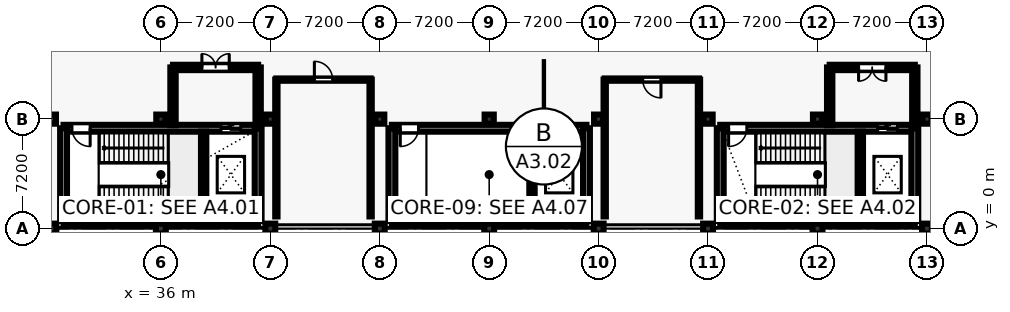
"""IFC4 building model, lengths in metres.
Left out: names, types, materials, properties, quantities, classifications, styles, units other than length and angle.
Written with IfcOpenShell. Run it as: python <this file> out.ifc"""

import sys

from ifc_helpers import new_model, si_unit, direction, frame, frame_2d, origin, origin_2d, place, context, subcontext, project, spatial, rectangle, extrude, element, fill, save


model = new_model("IFC4")
c1 = context("Model", 3, precision=1e-05, world=origin(), true_north=direction((0.0, 1.0)))
c2 = subcontext(c1, "Body", "Model", "MODEL_VIEW")
j1 = project(units=[si_unit("LENGTHUNIT", "METRE"), si_unit("PLANEANGLEUNIT", "RADIAN")], contexts=[c1])
p1 = place(None, origin())
s1 = spatial("IfcSite", under=j1, at=p1, CompositionType="ELEMENT")
p2 = place(p1, origin())
s2 = spatial("IfcBuilding", under=s1, at=p2, CompositionType="ELEMENT")
p3 = place(p2, frame((0.0, 0.0, 13.8)))
s3 = spatial("IfcBuildingStorey", under=s2, at=p3, CompositionType="ELEMENT", Elevation=13.8)
p4 = place(p3, frame((28.8, 0.0, 0.0), z_axis=(0.0, 0.0, 1.0), x_axis=(1.0, 0.0, 0.0)))
e1 = element("IfcColumn", 1, at=p4, inside=s3, PredefinedType="COLUMN", context=c2, shape_type="SweptSolid", body=[
    extrude(rectangle(XDim=0.65, YDim=0.65, at=origin_2d()), origin(), (0.0, 0.0, 1.0), 4.8),
])
p5 = place(p3, frame((28.8, 7.2, 0.0), z_axis=(0.0, 0.0, 1.0), x_axis=(1.0, 0.0, 0.0)))
e2 = element("IfcColumn", 2, at=p5, inside=s3, PredefinedType="COLUMN", context=c2, shape_type="SweptSolid", body=[
    extrude(rectangle(XDim=0.6, YDim=0.6, at=origin_2d()), origin(), (0.0, 0.0, 1.0), 4.8),
])
p6 = place(p3, frame((36.0, 0.0, 0.0), z_axis=(0.0, 0.0, 1.0), x_axis=(1.0, 0.0, 0.0)))
e3 = element("IfcColumn", 3, at=p6, inside=s3, PredefinedType="COLUMN", context=c2, shape_type="SweptSolid", body=[
    extrude(rectangle(XDim=0.65, YDim=0.65, at=origin_2d()), origin(), (0.0, 0.0, 1.0), 4.8),
])
p7 = place(p3, frame((36.0, 7.2, 0.0), z_axis=(0.0, 0.0, 1.0), x_axis=(1.0, 0.0, 0.0)))
e4 = element("IfcColumn", 4, at=p7, inside=s3, PredefinedType="COLUMN", context=c2, shape_type="SweptSolid", body=[
    extrude(rectangle(XDim=0.6, YDim=0.6, at=origin_2d()), origin(), (0.0, 0.0, 1.0), 4.8),
])
p8 = place(p3, frame((43.2, 0.0, 0.0), z_axis=(0.0, 0.0, 1.0), x_axis=(1.0, 0.0, 0.0)))
e5 = element("IfcColumn", 5, at=p8, inside=s3, PredefinedType="COLUMN", context=c2, shape_type="SweptSolid", body=[
    extrude(rectangle(XDim=0.65, YDim=0.65, at=origin_2d()), origin(), (0.0, 0.0, 1.0), 4.8),
])
p9 = place(p3, frame((43.2, 7.2, 0.0), z_axis=(0.0, 0.0, 1.0), x_axis=(1.0, 0.0, 0.0)))
e6 = element("IfcColumn", 6, at=p9, inside=s3, PredefinedType="COLUMN", context=c2, shape_type="SweptSolid", body=[
    extrude(rectangle(XDim=0.6, YDim=0.6, at=origin_2d()), origin(), (0.0, 0.0, 1.0), 4.8),
])
p10 = place(p3, frame((50.4, 0.0, 0.0), z_axis=(0.0, 0.0, 1.0), x_axis=(1.0, 0.0, 0.0)))
e7 = element("IfcColumn", 7, at=p10, inside=s3, PredefinedType="COLUMN", context=c2, shape_type="SweptSolid", body=[
    extrude(rectangle(XDim=0.65, YDim=0.65, at=origin_2d()), origin(), (0.0, 0.0, 1.0), 4.8),
])
p11 = place(p3, frame((50.4, 7.2, 0.0), z_axis=(0.0, 0.0, 1.0), x_axis=(1.0, 0.0, 0.0)))
e8 = element("IfcColumn", 8, at=p11, inside=s3, PredefinedType="COLUMN", context=c2, shape_type="SweptSolid", body=[
    extrude(rectangle(XDim=0.6, YDim=0.6, at=origin_2d()), origin(), (0.0, 0.0, 1.0), 4.8),
])
p12 = place(p3, frame((57.6, 0.0, 0.0), z_axis=(0.0, 0.0, 1.0), x_axis=(1.0, 0.0, 0.0)))
e9 = element("IfcColumn", 9, at=p12, inside=s3, PredefinedType="COLUMN", context=c2, shape_type="SweptSolid", body=[
    extrude(rectangle(XDim=0.65, YDim=0.65, at=origin_2d()), origin(), (0.0, 0.0, 1.0), 4.8),
])
p13 = place(p3, frame((57.6, 7.2, 0.0), z_axis=(0.0, 0.0, 1.0), x_axis=(1.0, 0.0, 0.0)))
e10 = element("IfcColumn", 10, at=p13, inside=s3, PredefinedType="COLUMN", context=c2, shape_type="SweptSolid", body=[
    extrude(rectangle(XDim=0.6, YDim=0.6, at=origin_2d()), origin(), (0.0, 0.0, 1.0), 4.8),
])
p14 = place(p3, frame((64.8, 0.0, 0.0), z_axis=(0.0, 0.0, 1.0), x_axis=(1.0, 0.0, 0.0)))
e11 = element("IfcColumn", 11, at=p14, inside=s3, PredefinedType="COLUMN", context=c2, shape_type="SweptSolid", body=[
    extrude(rectangle(XDim=0.65, YDim=0.65, at=origin_2d()), origin(), (0.0, 0.0, 1.0), 4.8),
])
p15 = place(p3, frame((64.8, 7.2, 0.0), z_axis=(0.0, 0.0, 1.0), x_axis=(1.0, 0.0, 0.0)))
e12 = element("IfcColumn", 12, at=p15, inside=s3, PredefinedType="COLUMN", context=c2, shape_type="SweptSolid", body=[
    extrude(rectangle(XDim=0.6, YDim=0.6, at=origin_2d()), origin(), (0.0, 0.0, 1.0), 4.8),
])
p16 = place(p3, frame((72.0, 0.0, 0.0), z_axis=(0.0, 0.0, 1.0), x_axis=(1.0, 0.0, 0.0)))
e13 = element("IfcColumn", 13, at=p16, inside=s3, PredefinedType="COLUMN", context=c2, shape_type="SweptSolid", body=[
    extrude(rectangle(XDim=0.65, YDim=0.65, at=origin_2d()), origin(), (0.0, 0.0, 1.0), 4.8),
])
p17 = place(p3, frame((72.0, 7.2, 0.0), z_axis=(0.0, 0.0, 1.0), x_axis=(1.0, 0.0, 0.0)))
e14 = element("IfcColumn", 14, at=p17, inside=s3, PredefinedType="COLUMN", context=c2, shape_type="SweptSolid", body=[
    extrude(rectangle(XDim=0.6, YDim=0.6, at=origin_2d()), origin(), (0.0, 0.0, 1.0), 4.8),
])
p18 = place(p3, frame((79.2, 0.0, 0.0), z_axis=(0.0, 0.0, 1.0), x_axis=(1.0, 0.0, 0.0)))
e15 = element("IfcColumn", 15, at=p18, inside=s3, PredefinedType="COLUMN", context=c2, shape_type="SweptSolid", body=[
    extrude(rectangle(XDim=0.65, YDim=0.65, at=origin_2d()), origin(), (0.0, 0.0, 1.0), 4.8),
])
p19 = place(p3, frame((79.2, 7.2, 0.0), z_axis=(0.0, 0.0, 1.0), x_axis=(1.0, 0.0, 0.0)))
e16 = element("IfcColumn", 16, at=p19, inside=s3, PredefinedType="COLUMN", context=c2, shape_type="SweptSolid", body=[
    extrude(rectangle(XDim=0.6, YDim=0.6, at=origin_2d()), origin(), (0.0, 0.0, 1.0), 4.8),
])
p20 = place(p3, frame((86.4, 0.0, 0.0), z_axis=(0.0, 0.0, 1.0), x_axis=(1.0, 0.0, 0.0)))
e17 = element("IfcColumn", 17, at=p20, inside=s3, PredefinedType="COLUMN", context=c2, shape_type="SweptSolid", body=[
    extrude(rectangle(XDim=0.65, YDim=0.65, at=origin_2d()), origin(), (0.0, 0.0, 1.0), 4.8),
])
p21 = place(p3, frame((86.4, 7.2, 0.0), z_axis=(0.0, 0.0, 1.0), x_axis=(1.0, 0.0, 0.0)))
e18 = element("IfcColumn", 18, at=p21, inside=s3, PredefinedType="COLUMN", context=c2, shape_type="SweptSolid", body=[
    extrude(rectangle(XDim=0.6, YDim=0.6, at=origin_2d()), origin(), (0.0, 0.0, 1.0), 4.8),
])
p22 = place(p3, frame((29.6, 0.5, 0.0), z_axis=(0.0, 0.0, 1.0), x_axis=(1.0, 0.0, 0.0)))
e19 = element("IfcWall", 19, at=p22, inside=s3, PredefinedType="SHEAR", context=c2, shape_type="SweptSolid", body=[
    extrude(rectangle(XDim=12.8, YDim=0.45, at=frame_2d((6.4, 0.0))), origin(), (0.0, 0.0, 1.0), 4.53),
])
p23 = place(p3, frame((29.6, 6.6, 0.0), z_axis=(0.0, 0.0, 1.0), x_axis=(1.0, 0.0, 0.0)))
e20 = element("IfcWall", 20, at=p23, inside=s3, PredefinedType="SHEAR", context=c2, shape_type="SweptSolid", body=[
    extrude(rectangle(XDim=12.8, YDim=0.45, at=frame_2d((6.4, 0.0))), origin(), (0.0, 0.0, 1.0), 4.53),
])
p24 = place(p23, frame((0.55, 0.0, 0.0)))
e21 = element("IfcOpeningElement", 21, at=p24, cuts=e20, PredefinedType="OPENING", context=c2, shape_type="SweptSolid", body=[
    extrude(rectangle(XDim=1.2, YDim=2.25, at=frame_2d((0.6, 1.125))), frame((0.0, 0.235, 0.0), z_axis=(0.0, -1.0, 0.0), x_axis=(1.0, 0.0, 0.0)), (0.0, 0.0, 1.0), 0.47),
])
p25 = place(p23, frame((10.358, 0.0, 0.0)))
e22 = element("IfcOpeningElement", 22, at=p25, cuts=e20, PredefinedType="OPENING", context=c2, shape_type="SweptSolid", body=[
    extrude(rectangle(XDim=1.3, YDim=2.25, at=frame_2d((0.65, 1.125))), frame((0.0, 0.235, 0.0), z_axis=(0.0, -1.0, 0.0), x_axis=(1.0, 0.0, 0.0)), (0.0, 0.0, 1.0), 0.47),
])
for number, where, z_axis, x_axis in (
    (23, (29.6, 0.5, 0.0), (0.0, 0.0, 1.0), (0.0, 1.0, 0.0)),
    (24, (42.4, 0.5, 0.0), (0.0, 0.0, 1.0), (0.0, 1.0, 0.0)),
):
    element("IfcWall", number, at=place(p3, frame(where, z_axis=z_axis, x_axis=x_axis)), inside=s3, PredefinedType="SHEAR", context=c2, shape_type="SweptSolid", body=[
        extrude(rectangle(XDim=6.1, YDim=0.45, at=frame_2d((3.05, 0.0))), origin(), (0.0, 0.0, 1.0), 4.53),
    ])
p26 = place(p3, frame((38.816, 0.725, 0.0), z_axis=(0.0, 0.0, 1.0), x_axis=(0.0, 1.0, 0.0)))
e25 = element("IfcWall", 25, at=p26, inside=s3, PredefinedType="SHEAR", context=c2, shape_type="SweptSolid", body=[
    extrude(rectangle(XDim=5.65, YDim=0.35, at=frame_2d((2.825, 0.0))), origin(), (0.0, 0.0, 1.0), 4.53),
])
p27 = place(p3, frame((72.8, 0.5, 0.0), z_axis=(0.0, 0.0, 1.0), x_axis=(1.0, 0.0, 0.0)))
e26 = element("IfcWall", 26, at=p27, inside=s3, PredefinedType="SHEAR", context=c2, shape_type="SweptSolid", body=[
    extrude(rectangle(XDim=12.8, YDim=0.45, at=frame_2d((6.4, 0.0))), origin(), (0.0, 0.0, 1.0), 4.53),
])
p28 = place(p3, frame((72.8, 6.6, 0.0), z_axis=(0.0, 0.0, 1.0), x_axis=(1.0, 0.0, 0.0)))
e27 = element("IfcWall", 27, at=p28, inside=s3, PredefinedType="SHEAR", context=c2, shape_type="SweptSolid", body=[
    extrude(rectangle(XDim=12.8, YDim=0.45, at=frame_2d((6.4, 0.0))), origin(), (0.0, 0.0, 1.0), 4.53),
])
p29 = place(p28, frame((0.55, 0.0, 0.0)))
e28 = element("IfcOpeningElement", 28, at=p29, cuts=e27, PredefinedType="OPENING", context=c2, shape_type="SweptSolid", body=[
    extrude(rectangle(XDim=1.2, YDim=2.25, at=frame_2d((0.6, 1.125))), frame((0.0, 0.235, 0.0), z_axis=(0.0, -1.0, 0.0), x_axis=(1.0, 0.0, 0.0)), (0.0, 0.0, 1.0), 0.47),
])
p30 = place(p28, frame((10.358, 0.0, 0.0)))
e29 = element("IfcOpeningElement", 29, at=p30, cuts=e27, PredefinedType="OPENING", context=c2, shape_type="SweptSolid", body=[
    extrude(rectangle(XDim=1.3, YDim=2.25, at=frame_2d((0.65, 1.125))), frame((0.0, 0.235, 0.0), z_axis=(0.0, -1.0, 0.0), x_axis=(1.0, 0.0, 0.0)), (0.0, 0.0, 1.0), 0.47),
])
for number, where, z_axis, x_axis in (
    (30, (72.8, 0.5, 0.0), (0.0, 0.0, 1.0), (0.0, 1.0, 0.0)),
    (31, (85.6, 0.5, 0.0), (0.0, 0.0, 1.0), (0.0, 1.0, 0.0)),
):
    element("IfcWall", number, at=place(p3, frame(where, z_axis=z_axis, x_axis=x_axis)), inside=s3, PredefinedType="SHEAR", context=c2, shape_type="SweptSolid", body=[
        extrude(rectangle(XDim=6.1, YDim=0.45, at=frame_2d((3.05, 0.0))), origin(), (0.0, 0.0, 1.0), 4.53),
    ])
p31 = place(p3, frame((82.016, 0.725, 0.0), z_axis=(0.0, 0.0, 1.0), x_axis=(0.0, 1.0, 0.0)))
e32 = element("IfcWall", 32, at=p31, inside=s3, PredefinedType="SHEAR", context=c2, shape_type="SweptSolid", body=[
    extrude(rectangle(XDim=5.65, YDim=0.35, at=frame_2d((2.825, 0.0))), origin(), (0.0, 0.0, 1.0), 4.53),
])
p32 = place(p3, frame((51.2, 0.5, 0.0), z_axis=(0.0, 0.0, 1.0), x_axis=(1.0, 0.0, 0.0)))
e33 = element("IfcWall", 33, at=p32, inside=s3, PredefinedType="SHEAR", context=c2, shape_type="SweptSolid", body=[
    extrude(rectangle(XDim=12.8, YDim=0.45, at=frame_2d((6.4, 0.0))), origin(), (0.0, 0.0, 1.0), 4.53),
])
p33 = place(p3, frame((51.2, 6.6, 0.0), z_axis=(0.0, 0.0, 1.0), x_axis=(1.0, 0.0, 0.0)))
e34 = element("IfcWall", 34, at=p33, inside=s3, PredefinedType="SHEAR", context=c2, shape_type="SweptSolid", body=[
    extrude(rectangle(XDim=12.8, YDim=0.45, at=frame_2d((6.4, 0.0))), origin(), (0.0, 0.0, 1.0), 4.53),
])
p34 = place(p33, frame((0.55, 0.0, 0.0)))
e35 = element("IfcOpeningElement", 35, at=p34, cuts=e34, PredefinedType="OPENING", context=c2, shape_type="SweptSolid", body=[
    extrude(rectangle(XDim=1.2, YDim=2.25, at=frame_2d((0.6, 1.125))), frame((0.0, 0.235, 0.0), z_axis=(0.0, -1.0, 0.0), x_axis=(1.0, 0.0, 0.0)), (0.0, 0.0, 1.0), 0.47),
])
p35 = place(p33, frame((10.458, 0.0, 0.0)))
e36 = element("IfcOpeningElement", 36, at=p35, cuts=e34, PredefinedType="OPENING", context=c2, shape_type="SweptSolid", body=[
    extrude(rectangle(XDim=1.1, YDim=2.2, at=frame_2d((0.55, 1.1))), frame((0.0, 0.235, 0.0), z_axis=(0.0, -1.0, 0.0), x_axis=(1.0, 0.0, 0.0)), (0.0, 0.0, 1.0), 0.47),
])
for number, where, z_axis, x_axis in (
    (37, (51.2, 0.5, 0.0), (0.0, 0.0, 1.0), (0.0, 1.0, 0.0)),
    (38, (64.0, 0.5, 0.0), (0.0, 0.0, 1.0), (0.0, 1.0, 0.0)),
):
    element("IfcWall", number, at=place(p3, frame(where, z_axis=z_axis, x_axis=x_axis)), inside=s3, PredefinedType="SHEAR", context=c2, shape_type="SweptSolid", body=[
        extrude(rectangle(XDim=6.1, YDim=0.45, at=frame_2d((3.05, 0.0))), origin(), (0.0, 0.0, 1.0), 4.53),
    ])
p36 = place(p3, frame((60.416, 0.725, 0.0), z_axis=(0.0, 0.0, 1.0), x_axis=(0.0, 1.0, 0.0)))
e39 = element("IfcWall", 39, at=p36, inside=s3, PredefinedType="SHEAR", context=c2, shape_type="SweptSolid", body=[
    extrude(rectangle(XDim=5.65, YDim=0.35, at=frame_2d((2.825, 0.0))), origin(), (0.0, 0.0, 1.0), 4.53),
])
p37 = place(p3, frame((42.4, 6.8, 0.0), z_axis=(0.0, 0.0, 1.0), x_axis=(0.0, 1.0, 0.0)))
e40 = element("IfcWall", 40, at=p37, inside=s3, PredefinedType="SHEAR", context=c2, shape_type="SweptSolid", body=[
    extrude(rectangle(XDim=3.8, YDim=0.35, at=frame_2d((1.9, 0.0))), origin(), (0.0, 0.0, 1.0), 3.59),
])
p38 = place(p3, frame((42.4, 10.6, 0.0), z_axis=(0.0, 0.0, 1.0), x_axis=(-1.0, 0.0, 0.0)))
e41 = element("IfcWall", 41, at=p38, inside=s3, PredefinedType="SHEAR", context=c2, shape_type="SweptSolid", body=[
    extrude(rectangle(XDim=5.6, YDim=0.35, at=frame_2d((2.8, 0.0))), origin(), (0.0, 0.0, 1.0), 3.59),
])
p39 = place(p38, frame((1.9, 0.0, 0.0)))
e42 = element("IfcOpeningElement", 42, at=p39, cuts=e41, PredefinedType="OPENING", context=c2, shape_type="SweptSolid", body=[
    extrude(rectangle(XDim=1.8, YDim=2.3, at=frame_2d((0.9, 1.15))), frame((0.0, 0.185, 0.0), z_axis=(0.0, -1.0, 0.0), x_axis=(1.0, 0.0, 0.0)), (0.0, 0.0, 1.0), 0.37),
])
for number, where, z_axis, x_axis in (
    (43, (36.8, 10.6, 0.0), (0.0, 0.0, 1.0), (0.0, -1.0, 0.0)),
    (44, (85.6, 6.8, 0.0), (0.0, 0.0, 1.0), (0.0, 1.0, 0.0)),
):
    element("IfcWall", number, at=place(p3, frame(where, z_axis=z_axis, x_axis=x_axis)), inside=s3, PredefinedType="SHEAR", context=c2, shape_type="SweptSolid", body=[
        extrude(rectangle(XDim=3.8, YDim=0.35, at=frame_2d((1.9, 0.0))), origin(), (0.0, 0.0, 1.0), 3.59),
    ])
p40 = place(p3, frame((85.6, 10.6, 0.0), z_axis=(0.0, 0.0, 1.0), x_axis=(-1.0, 0.0, 0.0)))
e45 = element("IfcWall", 45, at=p40, inside=s3, PredefinedType="SHEAR", context=c2, shape_type="SweptSolid", body=[
    extrude(rectangle(XDim=5.6, YDim=0.35, at=frame_2d((2.8, 0.0))), origin(), (0.0, 0.0, 1.0), 3.59),
])
p41 = place(p40, frame((1.9, 0.0, 0.0)))
e46 = element("IfcOpeningElement", 46, at=p41, cuts=e45, PredefinedType="OPENING", context=c2, shape_type="SweptSolid", body=[
    extrude(rectangle(XDim=1.8, YDim=2.3, at=frame_2d((0.9, 1.15))), frame((0.0, 0.185, 0.0), z_axis=(0.0, -1.0, 0.0), x_axis=(1.0, 0.0, 0.0)), (0.0, 0.0, 1.0), 0.37),
])
p42 = place(p3, frame((80.0, 10.6, 0.0), z_axis=(0.0, 0.0, 1.0), x_axis=(0.0, -1.0, 0.0)))
e47 = element("IfcWall", 47, at=p42, inside=s3, PredefinedType="SHEAR", context=c2, shape_type="SweptSolid", body=[
    extrude(rectangle(XDim=3.8, YDim=0.35, at=frame_2d((1.9, 0.0))), origin(), (0.0, 0.0, 1.0), 3.59),
])
p43 = place(p3, frame((71.4, 0.8, 0.0), z_axis=(0.0, 0.0, 1.0), x_axis=(0.0, 1.0, 0.0)))
e48 = element("IfcWall", 48, at=p43, inside=s3, PredefinedType="PARTITIONING", context=c2, shape_type="SweptSolid", body=[
    extrude(rectangle(XDim=9.0, YDim=0.15, at=frame_2d((4.5, 0.0))), origin(), (0.0, 0.0, 1.0), 3.59),
])
p44 = place(p3, frame((71.4, 9.8, 0.0), z_axis=(0.0, 0.0, 1.0), x_axis=(-1.0, 0.0, 0.0)))
e49 = element("IfcWall", 49, at=p44, inside=s3, PredefinedType="PARTITIONING", context=c2, shape_type="SweptSolid", body=[
    extrude(rectangle(XDim=6.2, YDim=0.15, at=frame_2d((3.1, 0.0))), origin(), (0.0, 0.0, 1.0), 3.59),
])
p45 = place(p44, frame((2.5, 0.0, 0.0)))
e50 = element("IfcOpeningElement", 50, at=p45, cuts=e49, PredefinedType="OPENING", context=c2, shape_type="SweptSolid", body=[
    extrude(rectangle(XDim=1.2, YDim=2.2, at=frame_2d((0.6, 1.1))), frame((0.0, 0.085, 0.0), z_axis=(0.0, -1.0, 0.0), x_axis=(1.0, 0.0, 0.0)), (0.0, 0.0, 1.0), 0.17),
])
for number, where, z_axis, x_axis in (
    (51, (65.2, 9.8, 0.0), (0.0, 0.0, 1.0), (0.0, -1.0, 0.0)),
    (52, (49.8, 0.8, 0.0), (0.0, 0.0, 1.0), (0.0, 1.0, 0.0)),
):
    element("IfcWall", number, at=place(p3, frame(where, z_axis=z_axis, x_axis=x_axis)), inside=s3, PredefinedType="PARTITIONING", context=c2, shape_type="SweptSolid", body=[
        extrude(rectangle(XDim=9.0, YDim=0.15, at=frame_2d((4.5, 0.0))), origin(), (0.0, 0.0, 1.0), 3.59),
    ])
p46 = place(p3, frame((49.8, 9.8, 0.0), z_axis=(0.0, 0.0, 1.0), x_axis=(-1.0, 0.0, 0.0)))
e53 = element("IfcWall", 53, at=p46, inside=s3, PredefinedType="PARTITIONING", context=c2, shape_type="SweptSolid", body=[
    extrude(rectangle(XDim=6.2, YDim=0.15, at=frame_2d((3.1, 0.0))), origin(), (0.0, 0.0, 1.0), 3.59),
])
p47 = place(p46, frame((2.5, 0.0, 0.0)))
e54 = element("IfcOpeningElement", 54, at=p47, cuts=e53, PredefinedType="OPENING", context=c2, shape_type="SweptSolid", body=[
    extrude(rectangle(XDim=1.2, YDim=2.2, at=frame_2d((0.6, 1.1))), frame((0.0, 0.085, 0.0), z_axis=(0.0, -1.0, 0.0), x_axis=(1.0, 0.0, 0.0)), (0.0, 0.0, 1.0), 0.17),
])
p48 = place(p3, frame((43.6, 9.8, 0.0), z_axis=(0.0, 0.0, 1.0), x_axis=(0.0, -1.0, 0.0)))
e55 = element("IfcWall", 55, at=p48, inside=s3, PredefinedType="PARTITIONING", context=c2, shape_type="SweptSolid", body=[
    extrude(rectangle(XDim=9.0, YDim=0.15, at=frame_2d((4.5, 0.0))), origin(), (0.0, 0.0, 1.0), 3.59),
])
p49 = place(p24, frame((1.2, 0.0, 0.0), z_axis=(0.0, 0.0, 1.0), x_axis=(-1.0, 0.0, 0.0)))
e56 = element("IfcDoor", 56, at=p49, inside=s3, OperationType="SINGLE_SWING_RIGHT", PredefinedType="DOOR", context=c2, shape_type="SweptSolid", body=[
    extrude(rectangle(XDim=1.2, YDim=2.25, at=frame_2d((0.6, 1.125))), frame((0.0, 0.025, 0.0), z_axis=(0.0, -1.0, 0.0), x_axis=(1.0, 0.0, 0.0)), (0.0, 0.0, 1.0), 0.05),
])
fill(e21, e56)
p50 = place(p25, origin())
e57 = element("IfcDoor", 57, at=p50, inside=s3, OperationType="SLIDING_TO_LEFT", PredefinedType="DOOR", context=c2, shape_type="SweptSolid", body=[
    extrude(rectangle(XDim=1.3, YDim=2.25, at=frame_2d((0.65, 1.125))), frame((0.0, 0.025, 0.0), z_axis=(0.0, -1.0, 0.0), x_axis=(1.0, 0.0, 0.0)), (0.0, 0.0, 1.0), 0.05),
])
fill(e22, e57)
p51 = place(p29, frame((1.2, 0.0, 0.0), z_axis=(0.0, 0.0, 1.0), x_axis=(-1.0, 0.0, 0.0)))
e58 = element("IfcDoor", 58, at=p51, inside=s3, OperationType="SINGLE_SWING_LEFT", PredefinedType="DOOR", context=c2, shape_type="SweptSolid", body=[
    extrude(rectangle(XDim=1.2, YDim=2.25, at=frame_2d((0.6, 1.125))), frame((0.0, 0.025, 0.0), z_axis=(0.0, -1.0, 0.0), x_axis=(1.0, 0.0, 0.0)), (0.0, 0.0, 1.0), 0.05),
])
fill(e28, e58)
p52 = place(p30, origin())
e59 = element("IfcDoor", 59, at=p52, inside=s3, OperationType="SLIDING_TO_LEFT", PredefinedType="DOOR", context=c2, shape_type="SweptSolid", body=[
    extrude(rectangle(XDim=1.3, YDim=2.25, at=frame_2d((0.65, 1.125))), frame((0.0, 0.025, 0.0), z_axis=(0.0, -1.0, 0.0), x_axis=(1.0, 0.0, 0.0)), (0.0, 0.0, 1.0), 0.05),
])
fill(e29, e59)
p53 = place(p34, frame((1.2, 0.0, 0.0), z_axis=(0.0, 0.0, 1.0), x_axis=(-1.0, 0.0, 0.0)))
e60 = element("IfcDoor", 60, at=p53, inside=s3, OperationType="SINGLE_SWING_LEFT", PredefinedType="DOOR", context=c2, shape_type="SweptSolid", body=[
    extrude(rectangle(XDim=1.2, YDim=2.25, at=frame_2d((0.6, 1.125))), frame((0.0, 0.025, 0.0), z_axis=(0.0, -1.0, 0.0), x_axis=(1.0, 0.0, 0.0)), (0.0, 0.0, 1.0), 0.05),
])
fill(e35, e60)
p54 = place(p35, origin())
e61 = element("IfcDoor", 61, at=p54, inside=s3, OperationType="SLIDING_TO_RIGHT", PredefinedType="DOOR", context=c2, shape_type="SweptSolid", body=[
    extrude(rectangle(XDim=1.1, YDim=2.2, at=frame_2d((0.55, 1.1))), frame((0.0, 0.025, 0.0), z_axis=(0.0, -1.0, 0.0), x_axis=(1.0, 0.0, 0.0)), (0.0, 0.0, 1.0), 0.05),
])
fill(e36, e61)
p55 = place(p39, frame((1.8, 0.0, 0.0), z_axis=(0.0, 0.0, 1.0), x_axis=(-1.0, 0.0, 0.0)))
e62 = element("IfcDoor", 62, at=p55, inside=s3, OperationType="DOUBLE_DOOR_SINGLE_SWING", PredefinedType="DOOR", context=c2, shape_type="SweptSolid", body=[
    extrude(rectangle(XDim=1.8, YDim=2.3, at=frame_2d((0.9, 1.15))), frame((0.0, 0.025, 0.0), z_axis=(0.0, -1.0, 0.0), x_axis=(1.0, 0.0, 0.0)), (0.0, 0.0, 1.0), 0.05),
])
fill(e42, e62)
p56 = place(p41, origin())
e63 = element("IfcDoor", 63, at=p56, inside=s3, OperationType="DOUBLE_DOOR_SINGLE_SWING", PredefinedType="DOOR", context=c2, shape_type="SweptSolid", body=[
    extrude(rectangle(XDim=1.8, YDim=2.3, at=frame_2d((0.9, 1.15))), frame((0.0, 0.025, 0.0), z_axis=(0.0, -1.0, 0.0), x_axis=(1.0, 0.0, 0.0)), (0.0, 0.0, 1.0), 0.05),
])
fill(e46, e63)
p57 = place(p45, origin())
e64 = element("IfcDoor", 64, at=p57, inside=s3, OperationType="SINGLE_SWING_LEFT", PredefinedType="DOOR", context=c2, shape_type="SweptSolid", body=[
    extrude(rectangle(XDim=1.2, YDim=2.2, at=frame_2d((0.6, 1.1))), frame((0.0, 0.025, 0.0), z_axis=(0.0, -1.0, 0.0), x_axis=(1.0, 0.0, 0.0)), (0.0, 0.0, 1.0), 0.05),
])
fill(e50, e64)
p58 = place(p47, frame((1.2, 0.0, 0.0), z_axis=(0.0, 0.0, 1.0), x_axis=(-1.0, 0.0, 0.0)))
e65 = element("IfcDoor", 65, at=p58, inside=s3, OperationType="SINGLE_SWING_RIGHT", PredefinedType="DOOR", context=c2, shape_type="SweptSolid", body=[
    extrude(rectangle(XDim=1.2, YDim=2.2, at=frame_2d((0.6, 1.1))), frame((0.0, 0.025, 0.0), z_axis=(0.0, -1.0, 0.0), x_axis=(1.0, 0.0, 0.0)), (0.0, 0.0, 1.0), 0.05),
])
fill(e54, e65)
save(model, sys.argv[1])
